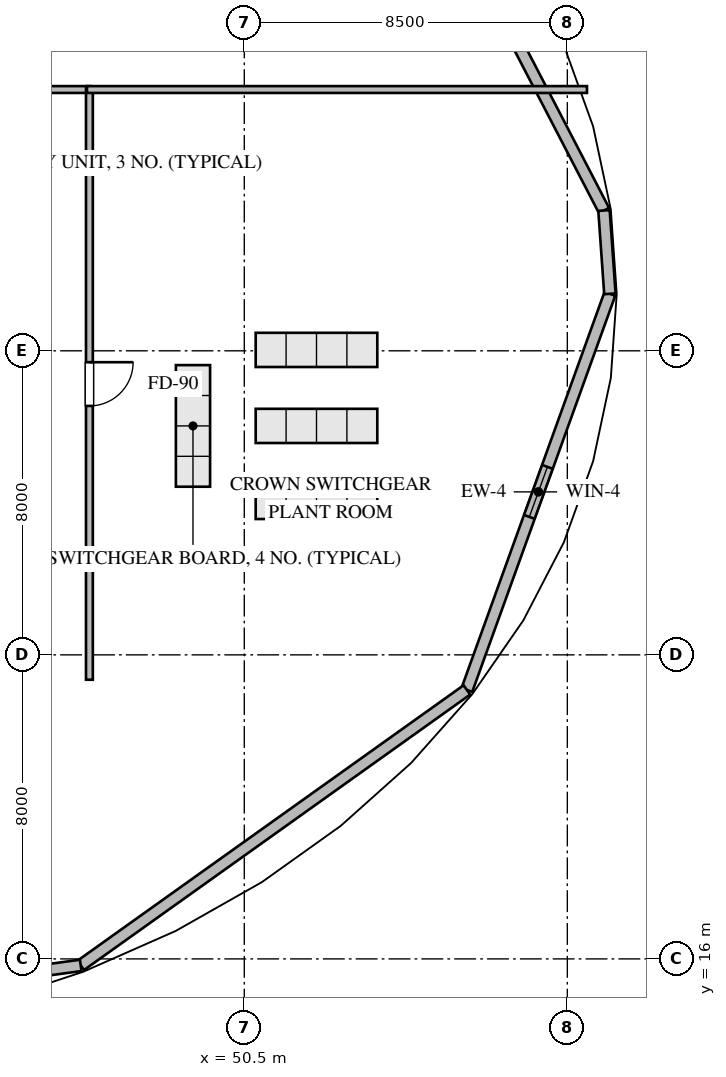
"""IFC4 building model, lengths in metres.
Left out: names, types, materials, properties, quantities, classifications, styles, units other than length and angle.
Written with IfcOpenShell. Run it as: python <this file> out.ifc"""

import sys

from ifc_helpers import new_model, si_unit, direction, frame, frame_2d, origin, place, context, subcontext, project, spatial, rectangle, extrude, element, fill, save


model = new_model("IFC4")
c1 = context("Model", 3, precision=1e-05, world=origin(), true_north=direction((0.0, 1.0)))
c2 = subcontext(c1, "Body", "Model", "MODEL_VIEW")
j1 = project(units=[si_unit("LENGTHUNIT", "METRE"), si_unit("PLANEANGLEUNIT", "RADIAN")], contexts=[c1])
p1 = place(None, origin())
s1 = spatial("IfcSite", under=j1, at=p1, CompositionType="ELEMENT")
p2 = place(p1, origin())
s2 = spatial("IfcBuilding", under=s1, at=p2, CompositionType="ELEMENT")
p3 = place(p2, frame((0.0, 0.0, 300.8)))
s3 = spatial("IfcBuildingStorey", under=s2, at=p3, CompositionType="ELEMENT", Elevation=300.8)
p4 = place(p3, frame((60.12, 33.5, 0.0), z_axis=(0.0, 0.0, 1.0), x_axis=(-0.339587618367, -0.940574425259, 0.0)))
e1 = element("IfcWall", 1, at=p4, inside=s3, PredefinedType="STANDARD", context=c2, shape_type="SweptSolid", body=[
    extrude(rectangle(XDim=11.082, YDim=0.3, at=frame_2d((5.541, 0.0))), origin(), (0.0, 0.0, 1.0), 3.72),
])
p5 = place(p4, frame((4.841, 0.0, 1.2)))
e2 = element("IfcOpeningElement", 2, at=p5, cuts=e1, PredefinedType="OPENING", context=c2, shape_type="SweptSolid", body=[
    extrude(rectangle(XDim=1.4, YDim=1.2, at=frame_2d((0.7, 0.6))), frame((0.0, 0.16, 0.0), z_axis=(0.0, -1.0, 0.0), x_axis=(1.0, 0.0, 0.0)), (0.0, 0.0, 1.0), 0.32),
])
p6 = place(p3, frame((56.357, 23.077, 0.0), z_axis=(0.0, 0.0, 1.0), x_axis=(-0.814111303181, -0.580708865123, 0.0)))
e3 = element("IfcWall", 3, at=p6, inside=s3, PredefinedType="STANDARD", context=c2, shape_type="SweptSolid", body=[
    extrude(rectangle(XDim=12.481, YDim=0.3, at=frame_2d((6.24, 0.0))), origin(), (0.0, 0.0, 1.0), 3.72),
])
p7 = place(p3, frame((46.196, 15.829, 0.0), z_axis=(0.0, 0.0, 1.0), x_axis=(-0.990927056791, -0.134400774248, 0.0)))
e4 = element("IfcWall", 4, at=p7, inside=s3, PredefinedType="STANDARD", context=c2, shape_type="SweptSolid", body=[
    extrude(rectangle(XDim=13.58, YDim=0.3, at=frame_2d((6.79, 0.0))), origin(), (0.0, 0.0, 1.0), 3.72),
])
p8 = place(p7, frame((6.09, 0.0, 1.2)))
e5 = element("IfcOpeningElement", 5, at=p8, cuts=e4, PredefinedType="OPENING", context=c2, shape_type="SweptSolid", body=[
    extrude(rectangle(XDim=1.4, YDim=1.2, at=frame_2d((0.7, 0.6))), frame((0.0, 0.16, 0.0), z_axis=(0.0, -1.0, 0.0), x_axis=(1.0, 0.0, 0.0)), (0.0, 0.0, 1.0), 0.32),
])
p9 = place(p3, frame((54.762, 45.718, 0.0), z_axis=(0.0, 0.0, 1.0), x_axis=(0.460623742834, -0.8875954977, 0.0)))
e6 = element("IfcWall", 6, at=p9, inside=s3, PredefinedType="STANDARD", context=c2, shape_type="SweptSolid", body=[
    extrude(rectangle(XDim=11.296, YDim=0.3, at=frame_2d((5.648, 0.0))), origin(), (0.0, 0.0, 1.0), 3.72),
])
p10 = place(p9, frame((4.948, 0.0, 1.2)))
e7 = element("IfcOpeningElement", 7, at=p10, cuts=e6, PredefinedType="OPENING", context=c2, shape_type="SweptSolid", body=[
    extrude(rectangle(XDim=1.4, YDim=1.2, at=frame_2d((0.7, 0.6))), frame((0.0, 0.16, 0.0), z_axis=(0.0, -1.0, 0.0), x_axis=(1.0, 0.0, 0.0)), (0.0, 0.0, 1.0), 0.32),
])
p11 = place(p3, frame((59.965, 35.692, 0.0), z_axis=(0.0, 0.0, 1.0), x_axis=(0.070552198309, -0.997508088846, 0.0)))
e8 = element("IfcWall", 8, at=p11, inside=s3, PredefinedType="STANDARD", context=c2, shape_type="SweptSolid", body=[
    extrude(rectangle(XDim=2.197, YDim=0.3, at=frame_2d((1.099, 0.0))), origin(), (0.0, 0.0, 1.0), 3.72),
])
p12 = place(p3, frame((34.435, 38.875, 0.0), z_axis=(0.0, 0.0, 1.0), x_axis=(1.0, 0.0, 0.0)))
e9 = element("IfcWall", 9, at=p12, inside=s3, PredefinedType="PARTITIONING", context=c2, shape_type="SweptSolid", body=[
    extrude(rectangle(XDim=12.02, YDim=0.18, at=frame_2d((6.01, 0.0))), origin(), (0.0, 0.0, 1.0), 3.72),
])
p13 = place(p12, frame((5.435, 0.0, 0.0)))
e10 = element("IfcOpeningElement", 10, at=p13, cuts=e9, PredefinedType="OPENING", context=c2, shape_type="SweptSolid", body=[
    extrude(rectangle(XDim=1.15, YDim=2.1, at=frame_2d((0.575, 1.05))), frame((0.0, 0.1, 0.0), z_axis=(0.0, -1.0, 0.0), x_axis=(1.0, 0.0, 0.0)), (0.0, 0.0, 1.0), 0.2),
])
p14 = place(p3, frame((46.425, 38.905, 0.0), z_axis=(0.0, 0.0, 1.0), x_axis=(0.0, -1.0, 0.0)))
e11 = element("IfcWall", 11, at=p14, inside=s3, PredefinedType="PARTITIONING", context=c2, shape_type="SweptSolid", body=[
    extrude(rectangle(XDim=15.56, YDim=0.18, at=frame_2d((7.78, 0.0))), origin(), (0.0, 0.0, 1.0), 3.72),
])
p15 = place(p14, frame((7.205, 0.0, 0.0)))
e12 = element("IfcOpeningElement", 12, at=p15, cuts=e11, PredefinedType="OPENING", context=c2, shape_type="SweptSolid", body=[
    extrude(rectangle(XDim=1.15, YDim=2.1, at=frame_2d((0.575, 1.05))), frame((0.0, 0.1, 0.0), z_axis=(0.0, -1.0, 0.0), x_axis=(1.0, 0.0, 0.0)), (0.0, 0.0, 1.0), 0.2),
])
p16 = place(p3, frame((59.517, 38.875, 0.0), z_axis=(0.0, 0.0, 1.0), x_axis=(-1.0, 0.0, 0.0)))
e13 = element("IfcWall", 13, at=p16, inside=s3, PredefinedType="PARTITIONING", context=c2, shape_type="SweptSolid", body=[
    extrude(rectangle(XDim=13.157, YDim=0.18, at=frame_2d((6.579, 0.0))), origin(), (0.0, 0.0, 1.0), 3.72),
])
p17 = place(p5, origin())
e14 = element("IfcWindow", 14, at=p17, inside=s3, PartitioningType="SINGLE_PANEL", PredefinedType="WINDOW", context=c2, shape_type="SweptSolid", body=[
    extrude(rectangle(XDim=1.4, YDim=1.2, at=frame_2d((0.7, 0.6))), frame((0.0, 0.03, 0.0), z_axis=(0.0, -1.0, 0.0), x_axis=(1.0, 0.0, 0.0)), (0.0, 0.0, 1.0), 0.06),
])
fill(e2, e14)
p18 = place(p15, origin())
e15 = element("IfcDoor", 15, at=p18, inside=s3, OperationType="SINGLE_SWING_LEFT", PredefinedType="DOOR", context=c2, shape_type="SweptSolid", body=[
    extrude(rectangle(XDim=1.15, YDim=2.1, at=frame_2d((0.575, 1.05))), frame((0.0, 0.025, 0.0), z_axis=(0.0, -1.0, 0.0), x_axis=(1.0, 0.0, 0.0)), (0.0, 0.0, 1.0), 0.05),
])
fill(e12, e15)
save(model, sys.argv[1])
